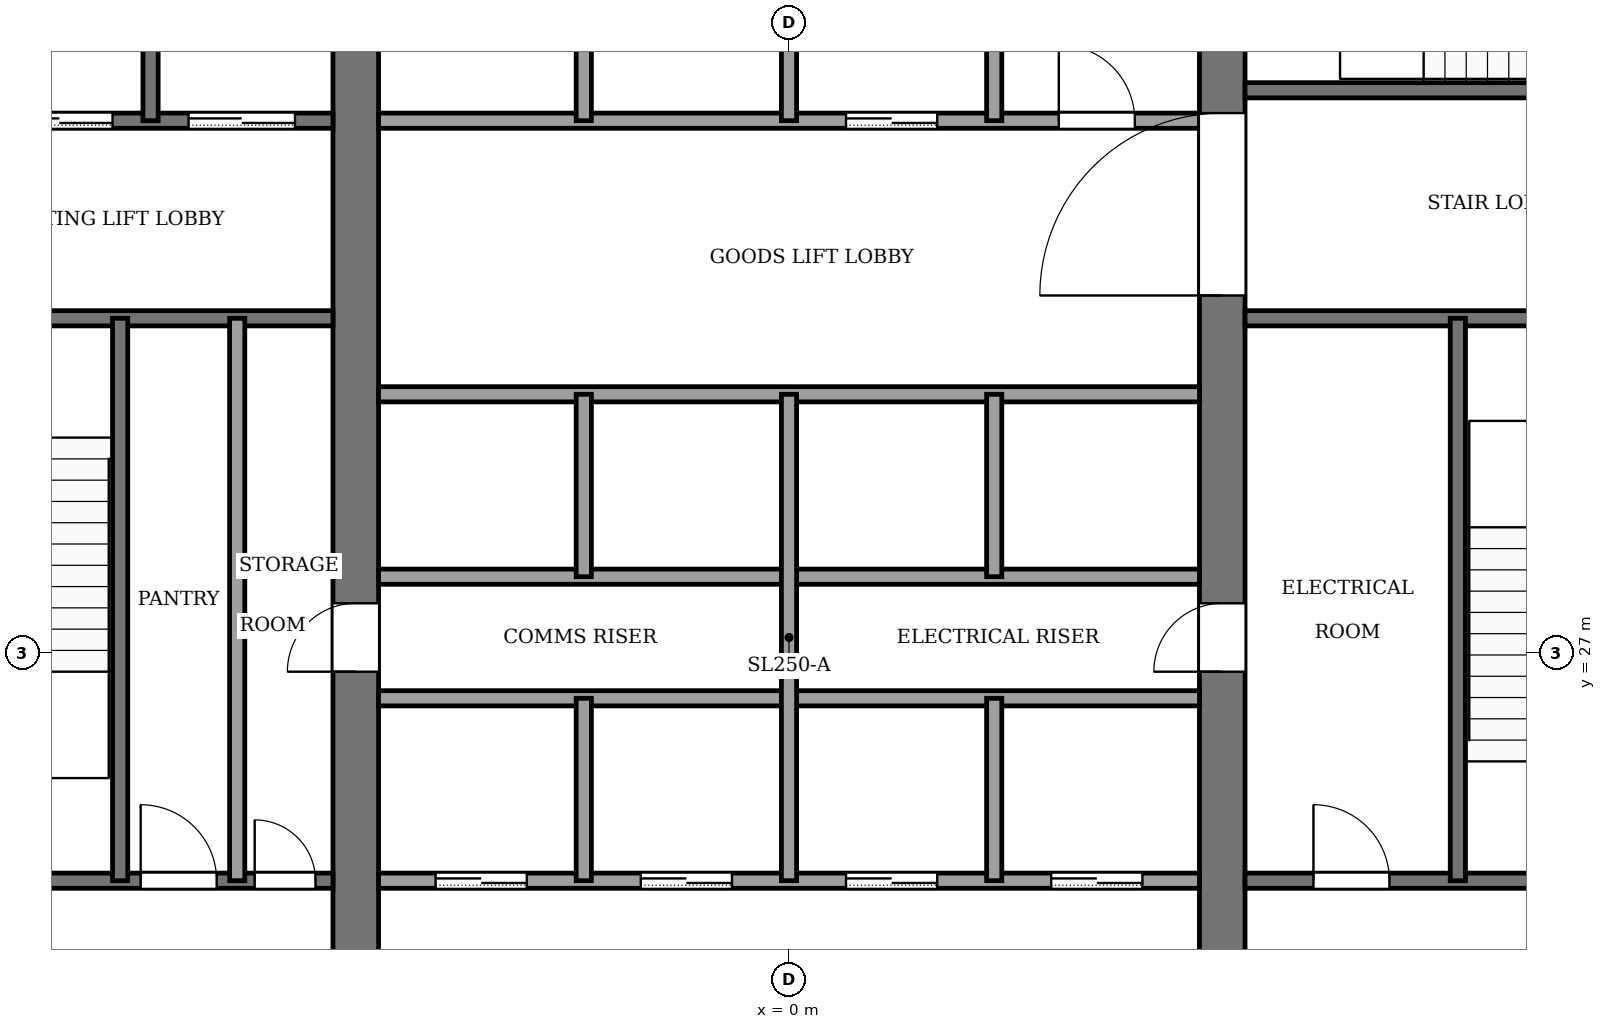
"""IFC4 building model, lengths in metres.
Left out: names, types, materials, properties, quantities, classifications, styles, units other than length and angle.
Written with IfcOpenShell. Run it as: python <this file> out.ifc"""

import sys

from ifc_helpers import new_model, si_unit, direction, frame, frame_2d, origin, place, context, subcontext, project, spatial, rectangle, extrude, element, fill, save


model = new_model("IFC4")
c1 = context("Model", 3, precision=1e-05, world=origin(), true_north=direction((0.0, 1.0)))
c2 = subcontext(c1, "Body", "Model", "MODEL_VIEW")
j1 = project(units=[si_unit("LENGTHUNIT", "METRE"), si_unit("PLANEANGLEUNIT", "RADIAN")], contexts=[c1])
p1 = place(None, origin())
s1 = spatial("IfcSite", under=j1, at=p1, CompositionType="ELEMENT")
p2 = place(p1, origin())
s2 = spatial("IfcBuilding", under=s1, at=p2, CompositionType="ELEMENT")
p3 = place(p2, frame((0.0, 0.0, 38.0)))
s3 = spatial("IfcBuildingStorey", under=s2, at=p3, CompositionType="ELEMENT", Elevation=38.0)
p4 = place(p3, frame((-5.7, 18.4, -0.13), z_axis=(0.0, 0.0, 1.0), x_axis=(0.0, 1.0, 0.0)))
e1 = element("IfcWall", 1, at=p4, inside=s3, PredefinedType="SHEAR", context=c2, shape_type="SweptSolid", body=[
    extrude(rectangle(XDim=19.2, YDim=0.6, at=frame_2d((9.6, 0.0))), origin(), (0.0, 0.0, 1.0), 4.0),
])
p5 = place(p4, frame((8.35, 0.0, 0.13)))
e2 = element("IfcOpeningElement", 2, at=p5, cuts=e1, PredefinedType="OPENING", context=c2, shape_type="SweptSolid", body=[
    extrude(rectangle(XDim=0.9, YDim=2.1, at=frame_2d((0.45, 1.05))), frame((0.0, 0.31, 0.0), z_axis=(0.0, -1.0, 0.0), x_axis=(1.0, 0.0, 0.0)), (0.0, 0.0, 1.0), 0.62),
])
p6 = place(p3, frame((5.7, 18.4, -0.13), z_axis=(0.0, 0.0, 1.0), x_axis=(0.0, 1.0, 0.0)))
e3 = element("IfcWall", 3, at=p6, inside=s3, PredefinedType="SHEAR", context=c2, shape_type="SweptSolid", body=[
    extrude(rectangle(XDim=19.2, YDim=0.6, at=frame_2d((9.6, 0.0))), origin(), (0.0, 0.0, 1.0), 4.0),
])
p7 = place(p6, frame((8.35, 0.0, 0.13)))
e4 = element("IfcOpeningElement", 4, at=p7, cuts=e3, PredefinedType="OPENING", context=c2, shape_type="SweptSolid", body=[
    extrude(rectangle(XDim=0.9, YDim=2.1, at=frame_2d((0.45, 1.05))), frame((0.0, 0.31, 0.0), z_axis=(0.0, -1.0, 0.0), x_axis=(1.0, 0.0, 0.0)), (0.0, 0.0, 1.0), 0.62),
])
p8 = place(p6, frame((13.3, 0.0, 0.13)))
e5 = element("IfcOpeningElement", 5, at=p8, cuts=e3, PredefinedType="OPENING", context=c2, shape_type="SweptSolid", body=[
    extrude(rectangle(XDim=2.4, YDim=2.4, at=frame_2d((1.2, 1.2))), frame((0.0, 0.31, 0.0), z_axis=(0.0, -1.0, 0.0), x_axis=(1.0, 0.0, 0.0)), (0.0, 0.0, 1.0), 0.62),
])
p9 = place(p3, frame((-12.6, 24.0, 0.0), z_axis=(0.0, 0.0, 1.0), x_axis=(1.0, 0.0, 0.0)))
e6 = element("IfcWall", 6, at=p9, inside=s3, PredefinedType="PARTITIONING", context=c2, shape_type="SweptSolid", body=[
    extrude(rectangle(XDim=6.6, YDim=0.2, at=frame_2d((3.3, 0.0))), origin(), (0.0, 0.0, 1.0), 3.87),
])
p10 = place(p9, frame((4.07, 0.0, 0.0)))
e7 = element("IfcOpeningElement", 7, at=p10, cuts=e6, PredefinedType="OPENING", context=c2, shape_type="SweptSolid", body=[
    extrude(rectangle(XDim=1.0, YDim=2.1, at=frame_2d((0.5, 1.05))), frame((0.0, 0.11, 0.0), z_axis=(0.0, -1.0, 0.0), x_axis=(1.0, 0.0, 0.0)), (0.0, 0.0, 1.0), 0.22),
])
p11 = place(p9, frame((5.57, 0.0, 0.0)))
e8 = element("IfcOpeningElement", 8, at=p11, cuts=e6, PredefinedType="OPENING", context=c2, shape_type="SweptSolid", body=[
    extrude(rectangle(XDim=0.8, YDim=2.1, at=frame_2d((0.4, 1.05))), frame((0.0, 0.11, 0.0), z_axis=(0.0, -1.0, 0.0), x_axis=(1.0, 0.0, 0.0)), (0.0, 0.0, 1.0), 0.22),
])
p12 = place(p3, frame((-5.4, 24.0, 0.0), z_axis=(0.0, 0.0, 1.0), x_axis=(1.0, 0.0, 0.0)))
e9 = element("IfcWall", 9, at=p12, inside=s3, PredefinedType="PARTITIONING", context=c2, shape_type="SweptSolid", body=[
    extrude(rectangle(XDim=10.8, YDim=0.2, at=frame_2d((5.4, 0.0))), origin(), (0.0, 0.0, 1.0), 3.87),
])
p13 = place(p12, frame((0.75, 0.0, 0.0)))
e10 = element("IfcOpeningElement", 10, at=p13, cuts=e9, PredefinedType="OPENING", context=c2, shape_type="SweptSolid", body=[
    extrude(rectangle(XDim=1.2, YDim=2.2, at=frame_2d((0.6, 1.1))), frame((0.0, 0.11, 0.0), z_axis=(0.0, -1.0, 0.0), x_axis=(1.0, 0.0, 0.0)), (0.0, 0.0, 1.0), 0.22),
])
p14 = place(p12, frame((3.45, 0.0, 0.0)))
e11 = element("IfcOpeningElement", 11, at=p14, cuts=e9, PredefinedType="OPENING", context=c2, shape_type="SweptSolid", body=[
    extrude(rectangle(XDim=1.2, YDim=2.2, at=frame_2d((0.6, 1.1))), frame((0.0, 0.11, 0.0), z_axis=(0.0, -1.0, 0.0), x_axis=(1.0, 0.0, 0.0)), (0.0, 0.0, 1.0), 0.22),
])
p15 = place(p12, frame((6.15, 0.0, 0.0)))
e12 = element("IfcOpeningElement", 12, at=p15, cuts=e9, PredefinedType="OPENING", context=c2, shape_type="SweptSolid", body=[
    extrude(rectangle(XDim=1.2, YDim=2.2, at=frame_2d((0.6, 1.1))), frame((0.0, 0.11, 0.0), z_axis=(0.0, -1.0, 0.0), x_axis=(1.0, 0.0, 0.0)), (0.0, 0.0, 1.0), 0.22),
])
p16 = place(p12, frame((8.85, 0.0, 0.0)))
e13 = element("IfcOpeningElement", 13, at=p16, cuts=e9, PredefinedType="OPENING", context=c2, shape_type="SweptSolid", body=[
    extrude(rectangle(XDim=1.2, YDim=2.2, at=frame_2d((0.6, 1.1))), frame((0.0, 0.11, 0.0), z_axis=(0.0, -1.0, 0.0), x_axis=(1.0, 0.0, 0.0)), (0.0, 0.0, 1.0), 0.22),
])
p17 = place(p3, frame((6.0, 24.0, 0.0), z_axis=(0.0, 0.0, 1.0), x_axis=(1.0, 0.0, 0.0)))
e14 = element("IfcWall", 14, at=p17, inside=s3, PredefinedType="PARTITIONING", context=c2, shape_type="SweptSolid", body=[
    extrude(rectangle(XDim=6.6, YDim=0.2, at=frame_2d((3.3, 0.0))), origin(), (0.0, 0.0, 1.0), 3.87),
])
p18 = place(p17, frame((0.9, 0.0, 0.0)))
e15 = element("IfcOpeningElement", 15, at=p18, cuts=e14, PredefinedType="OPENING", context=c2, shape_type="SweptSolid", body=[
    extrude(rectangle(XDim=1.0, YDim=2.1, at=frame_2d((0.5, 1.05))), frame((0.0, 0.11, 0.0), z_axis=(0.0, -1.0, 0.0), x_axis=(1.0, 0.0, 0.0)), (0.0, 0.0, 1.0), 0.22),
])
p19 = place(p17, frame((4.4, 0.0, 0.0)))
e16 = element("IfcOpeningElement", 16, at=p19, cuts=e14, PredefinedType="OPENING", context=c2, shape_type="SweptSolid", body=[
    extrude(rectangle(XDim=1.2, YDim=2.2, at=frame_2d((0.6, 1.1))), frame((0.0, 0.11, 0.0), z_axis=(0.0, -1.0, 0.0), x_axis=(1.0, 0.0, 0.0)), (0.0, 0.0, 1.0), 0.22),
])
for number, where, z_axis, x_axis in (
    (17, (-5.4, 26.4, 0.0), (0.0, 0.0, 1.0), (1.0, 0.0, 0.0)),
    (18, (-5.4, 28.0, 0.0), (0.0, 0.0, 1.0), (1.0, 0.0, 0.0)),
    (19, (-5.4, 30.4, 0.0), (0.0, 0.0, 1.0), (1.0, 0.0, 0.0)),
):
    element("IfcWall", number, at=place(p3, frame(where, z_axis=z_axis, x_axis=x_axis)), inside=s3, PredefinedType="PARTITIONING", context=c2, shape_type="SweptSolid", body=[
        extrude(rectangle(XDim=10.8, YDim=0.2, at=frame_2d((5.4, 0.0))), origin(), (0.0, 0.0, 1.0), 3.87),
    ])
p20 = place(p3, frame((-12.6, 31.4, 0.0), z_axis=(0.0, 0.0, 1.0), x_axis=(1.0, 0.0, 0.0)))
e20 = element("IfcWall", 20, at=p20, inside=s3, PredefinedType="PARTITIONING", context=c2, shape_type="SweptSolid", body=[
    extrude(rectangle(XDim=6.6, YDim=0.2, at=frame_2d((3.3, 0.0))), origin(), (0.0, 0.0, 1.0), 3.87),
])
p21 = place(p20, frame((1.0, 0.0, 0.0)))
e21 = element("IfcOpeningElement", 21, at=p21, cuts=e20, PredefinedType="OPENING", context=c2, shape_type="SweptSolid", body=[
    extrude(rectangle(XDim=1.2, YDim=2.2, at=frame_2d((0.6, 1.1))), frame((0.0, 0.11, 0.0), z_axis=(0.0, -1.0, 0.0), x_axis=(1.0, 0.0, 0.0)), (0.0, 0.0, 1.0), 0.22),
])
p22 = place(p3, frame((6.0, 31.4, 0.0), z_axis=(0.0, 0.0, 1.0), x_axis=(1.0, 0.0, 0.0)))
e22 = element("IfcWall", 22, at=p22, inside=s3, PredefinedType="PARTITIONING", context=c2, shape_type="SweptSolid", body=[
    extrude(rectangle(XDim=6.6, YDim=0.2, at=frame_2d((3.3, 0.0))), origin(), (0.0, 0.0, 1.0), 3.87),
])
p23 = place(p3, frame((-12.6, 34.0, 0.0), z_axis=(0.0, 0.0, 1.0), x_axis=(1.0, 0.0, 0.0)))
e23 = element("IfcWall", 23, at=p23, inside=s3, PredefinedType="PARTITIONING", context=c2, shape_type="SweptSolid", body=[
    extrude(rectangle(XDim=6.6, YDim=0.2, at=frame_2d((3.3, 0.0))), origin(), (0.0, 0.0, 1.0), 3.87),
])
p24 = place(p23, frame((4.7, 0.0, 0.0)))
e24 = element("IfcOpeningElement", 24, at=p24, cuts=e23, PredefinedType="OPENING", context=c2, shape_type="SweptSolid", body=[
    extrude(rectangle(XDim=1.4, YDim=2.2, at=frame_2d((0.7, 1.1))), frame((0.0, 0.11, 0.0), z_axis=(0.0, -1.0, 0.0), x_axis=(1.0, 0.0, 0.0)), (0.0, 0.0, 1.0), 0.22),
])
p25 = place(p23, frame((2.3, 0.0, 0.0)))
e25 = element("IfcOpeningElement", 25, at=p25, cuts=e23, PredefinedType="OPENING", context=c2, shape_type="SweptSolid", body=[
    extrude(rectangle(XDim=1.4, YDim=2.2, at=frame_2d((0.7, 1.1))), frame((0.0, 0.11, 0.0), z_axis=(0.0, -1.0, 0.0), x_axis=(1.0, 0.0, 0.0)), (0.0, 0.0, 1.0), 0.22),
])
p26 = place(p23, frame((0.45, 0.0, 0.0)))
e26 = element("IfcOpeningElement", 26, at=p26, cuts=e23, PredefinedType="OPENING", context=c2, shape_type="SweptSolid", body=[
    extrude(rectangle(XDim=0.9, YDim=2.1, at=frame_2d((0.45, 1.05))), frame((0.0, 0.11, 0.0), z_axis=(0.0, -1.0, 0.0), x_axis=(1.0, 0.0, 0.0)), (0.0, 0.0, 1.0), 0.22),
])
p27 = place(p3, frame((-5.4, 34.0, 0.0), z_axis=(0.0, 0.0, 1.0), x_axis=(1.0, 0.0, 0.0)))
e27 = element("IfcWall", 27, at=p27, inside=s3, PredefinedType="PARTITIONING", context=c2, shape_type="SweptSolid", body=[
    extrude(rectangle(XDim=10.8, YDim=0.2, at=frame_2d((5.4, 0.0))), origin(), (0.0, 0.0, 1.0), 3.87),
])
p28 = place(p27, frame((6.15, 0.0, 0.0)))
e28 = element("IfcOpeningElement", 28, at=p28, cuts=e27, PredefinedType="OPENING", context=c2, shape_type="SweptSolid", body=[
    extrude(rectangle(XDim=1.2, YDim=2.2, at=frame_2d((0.6, 1.1))), frame((0.0, 0.11, 0.0), z_axis=(0.0, -1.0, 0.0), x_axis=(1.0, 0.0, 0.0)), (0.0, 0.0, 1.0), 0.22),
])
p29 = place(p27, frame((8.95, 0.0, 0.0)))
e29 = element("IfcOpeningElement", 29, at=p29, cuts=e27, PredefinedType="OPENING", context=c2, shape_type="SweptSolid", body=[
    extrude(rectangle(XDim=1.0, YDim=2.1, at=frame_2d((0.5, 1.05))), frame((0.0, 0.11, 0.0), z_axis=(0.0, -1.0, 0.0), x_axis=(1.0, 0.0, 0.0)), (0.0, 0.0, 1.0), 0.22),
])
p30 = place(p3, frame((6.0, 34.4, 0.0), z_axis=(0.0, 0.0, 1.0), x_axis=(1.0, 0.0, 0.0)))
e30 = element("IfcWall", 30, at=p30, inside=s3, PredefinedType="PARTITIONING", context=c2, shape_type="SweptSolid", body=[
    extrude(rectangle(XDim=6.6, YDim=0.2, at=frame_2d((3.3, 0.0))), origin(), (0.0, 0.0, 1.0), 3.87),
])
p31 = place(p30, frame((4.8, 0.0, 0.0)))
e31 = element("IfcOpeningElement", 31, at=p31, cuts=e30, PredefinedType="OPENING", context=c2, shape_type="SweptSolid", body=[
    extrude(rectangle(XDim=1.2, YDim=2.2, at=frame_2d((0.6, 1.1))), frame((0.0, 0.11, 0.0), z_axis=(0.0, -1.0, 0.0), x_axis=(1.0, 0.0, 0.0)), (0.0, 0.0, 1.0), 0.22),
])
p32 = place(p3, frame((-8.8, 24.0, 0.0), z_axis=(0.0, 0.0, 1.0), x_axis=(0.0, 1.0, 0.0)))
e32 = element("IfcWall", 32, at=p32, inside=s3, PredefinedType="PARTITIONING", context=c2, shape_type="SweptSolid", body=[
    extrude(rectangle(XDim=7.4, YDim=0.2, at=frame_2d((3.7, 0.0))), origin(), (0.0, 0.0, 1.0), 3.87),
])
p33 = place(p3, frame((-8.4, 34.0, 0.0), z_axis=(0.0, 0.0, 1.0), x_axis=(0.0, 1.0, 0.0)))
e33 = element("IfcWall", 33, at=p33, inside=s3, PredefinedType="PARTITIONING", context=c2, shape_type="SweptSolid", body=[
    extrude(rectangle(XDim=3.6, YDim=0.2, at=frame_2d((1.8, 0.0))), origin(), (0.0, 0.0, 1.0), 3.87),
])
p34 = place(p3, frame((-7.26, 24.0, 0.0), z_axis=(0.0, 0.0, 1.0), x_axis=(0.0, 1.0, 0.0)))
e34 = element("IfcWall", 34, at=p34, inside=s3, PredefinedType="PARTITIONING", context=c2, shape_type="SweptSolid", body=[
    extrude(rectangle(XDim=7.4, YDim=0.2, at=frame_2d((3.7, 0.0))), origin(), (0.0, 0.0, 1.0), 3.87),
])
for number, where, z_axis, x_axis in (
    (35, (-2.7, 24.0, 0.0), (0.0, 0.0, 1.0), (0.0, 1.0, 0.0)),
    (36, (-2.7, 28.0, 0.0), (0.0, 0.0, 1.0), (0.0, 1.0, 0.0)),
):
    element("IfcWall", number, at=place(p3, frame(where, z_axis=z_axis, x_axis=x_axis)), inside=s3, PredefinedType="PARTITIONING", context=c2, shape_type="SweptSolid", body=[
        extrude(rectangle(XDim=2.4, YDim=0.2, at=frame_2d((1.2, 0.0))), origin(), (0.0, 0.0, 1.0), 3.87),
    ])
p35 = place(p3, frame((-2.7, 34.0, 0.0), z_axis=(0.0, 0.0, 1.0), x_axis=(0.0, 1.0, 0.0)))
e37 = element("IfcWall", 37, at=p35, inside=s3, PredefinedType="PARTITIONING", context=c2, shape_type="SweptSolid", body=[
    extrude(rectangle(XDim=3.6, YDim=0.2, at=frame_2d((1.8, 0.0))), origin(), (0.0, 0.0, 1.0), 3.87),
])
p36 = place(p3, frame((0.0, 24.0, 0.0), z_axis=(0.0, 0.0, 1.0), x_axis=(0.0, 1.0, 0.0)))
e38 = element("IfcWall", 38, at=p36, inside=s3, PredefinedType="PARTITIONING", context=c2, shape_type="SweptSolid", body=[
    extrude(rectangle(XDim=6.4, YDim=0.2, at=frame_2d((3.2, 0.0))), origin(), (0.0, 0.0, 1.0), 3.87),
])
p37 = place(p3, frame((0.0, 34.0, 0.0), z_axis=(0.0, 0.0, 1.0), x_axis=(0.0, 1.0, 0.0)))
e39 = element("IfcWall", 39, at=p37, inside=s3, PredefinedType="PARTITIONING", context=c2, shape_type="SweptSolid", body=[
    extrude(rectangle(XDim=3.6, YDim=0.2, at=frame_2d((1.8, 0.0))), origin(), (0.0, 0.0, 1.0), 3.87),
])
for number, where, z_axis, x_axis in (
    (40, (2.7, 24.0, 0.0), (0.0, 0.0, 1.0), (0.0, 1.0, 0.0)),
    (41, (2.7, 28.0, 0.0), (0.0, 0.0, 1.0), (0.0, 1.0, 0.0)),
):
    element("IfcWall", number, at=place(p3, frame(where, z_axis=z_axis, x_axis=x_axis)), inside=s3, PredefinedType="PARTITIONING", context=c2, shape_type="SweptSolid", body=[
        extrude(rectangle(XDim=2.4, YDim=0.2, at=frame_2d((1.2, 0.0))), origin(), (0.0, 0.0, 1.0), 3.87),
    ])
p38 = place(p3, frame((2.7, 34.0, 0.0), z_axis=(0.0, 0.0, 1.0), x_axis=(0.0, 1.0, 0.0)))
e42 = element("IfcWall", 42, at=p38, inside=s3, PredefinedType="PARTITIONING", context=c2, shape_type="SweptSolid", body=[
    extrude(rectangle(XDim=3.6, YDim=0.2, at=frame_2d((1.8, 0.0))), origin(), (0.0, 0.0, 1.0), 3.87),
])
p39 = place(p3, frame((8.8, 24.0, 0.0), z_axis=(0.0, 0.0, 1.0), x_axis=(0.0, 1.0, 0.0)))
e43 = element("IfcWall", 43, at=p39, inside=s3, PredefinedType="PARTITIONING", context=c2, shape_type="SweptSolid", body=[
    extrude(rectangle(XDim=7.4, YDim=0.2, at=frame_2d((3.7, 0.0))), origin(), (0.0, 0.0, 1.0), 3.87),
])
p40 = place(p13, origin())
e44 = element("IfcDoor", 44, at=p40, inside=s3, OperationType="SLIDING_TO_LEFT", PredefinedType="DOOR", context=c2, shape_type="SweptSolid", body=[
    extrude(rectangle(XDim=1.2, YDim=2.2, at=frame_2d((0.6, 1.1))), frame((0.0, 0.025, 0.0), z_axis=(0.0, -1.0, 0.0), x_axis=(1.0, 0.0, 0.0)), (0.0, 0.0, 1.0), 0.05),
])
fill(e10, e44)
p41 = place(p14, origin())
e45 = element("IfcDoor", 45, at=p41, inside=s3, OperationType="SLIDING_TO_LEFT", PredefinedType="DOOR", context=c2, shape_type="SweptSolid", body=[
    extrude(rectangle(XDim=1.2, YDim=2.2, at=frame_2d((0.6, 1.1))), frame((0.0, 0.025, 0.0), z_axis=(0.0, -1.0, 0.0), x_axis=(1.0, 0.0, 0.0)), (0.0, 0.0, 1.0), 0.05),
])
fill(e11, e45)
p42 = place(p15, origin())
e46 = element("IfcDoor", 46, at=p42, inside=s3, OperationType="SLIDING_TO_LEFT", PredefinedType="DOOR", context=c2, shape_type="SweptSolid", body=[
    extrude(rectangle(XDim=1.2, YDim=2.2, at=frame_2d((0.6, 1.1))), frame((0.0, 0.025, 0.0), z_axis=(0.0, -1.0, 0.0), x_axis=(1.0, 0.0, 0.0)), (0.0, 0.0, 1.0), 0.05),
])
fill(e12, e46)
p43 = place(p16, origin())
e47 = element("IfcDoor", 47, at=p43, inside=s3, OperationType="SLIDING_TO_LEFT", PredefinedType="DOOR", context=c2, shape_type="SweptSolid", body=[
    extrude(rectangle(XDim=1.2, YDim=2.2, at=frame_2d((0.6, 1.1))), frame((0.0, 0.025, 0.0), z_axis=(0.0, -1.0, 0.0), x_axis=(1.0, 0.0, 0.0)), (0.0, 0.0, 1.0), 0.05),
])
fill(e13, e47)
p44 = place(p28, origin())
e48 = element("IfcDoor", 48, at=p44, inside=s3, OperationType="SLIDING_TO_LEFT", PredefinedType="DOOR", context=c2, shape_type="SweptSolid", body=[
    extrude(rectangle(XDim=1.2, YDim=2.2, at=frame_2d((0.6, 1.1))), frame((0.0, 0.025, 0.0), z_axis=(0.0, -1.0, 0.0), x_axis=(1.0, 0.0, 0.0)), (0.0, 0.0, 1.0), 0.05),
])
fill(e28, e48)
p45 = place(p24, origin())
e49 = element("IfcDoor", 49, at=p45, inside=s3, OperationType="SLIDING_TO_LEFT", PredefinedType="DOOR", context=c2, shape_type="SweptSolid", body=[
    extrude(rectangle(XDim=1.4, YDim=2.2, at=frame_2d((0.7, 1.1))), frame((0.0, 0.025, 0.0), z_axis=(0.0, -1.0, 0.0), x_axis=(1.0, 0.0, 0.0)), (0.0, 0.0, 1.0), 0.05),
])
fill(e24, e49)
p46 = place(p25, origin())
e50 = element("IfcDoor", 50, at=p46, inside=s3, OperationType="SLIDING_TO_LEFT", PredefinedType="DOOR", context=c2, shape_type="SweptSolid", body=[
    extrude(rectangle(XDim=1.4, YDim=2.2, at=frame_2d((0.7, 1.1))), frame((0.0, 0.025, 0.0), z_axis=(0.0, -1.0, 0.0), x_axis=(1.0, 0.0, 0.0)), (0.0, 0.0, 1.0), 0.05),
])
fill(e25, e50)
p47 = place(p10, origin())
e51 = element("IfcDoor", 51, at=p47, inside=s3, OperationType="SINGLE_SWING_RIGHT", PredefinedType="DOOR", context=c2, shape_type="SweptSolid", body=[
    extrude(rectangle(XDim=1.0, YDim=2.1, at=frame_2d((0.5, 1.05))), frame((0.0, 0.025, 0.0), z_axis=(0.0, -1.0, 0.0), x_axis=(1.0, 0.0, 0.0)), (0.0, 0.0, 1.0), 0.05),
])
fill(e7, e51)
p48 = place(p11, origin())
e52 = element("IfcDoor", 52, at=p48, inside=s3, OperationType="SINGLE_SWING_LEFT", PredefinedType="DOOR", context=c2, shape_type="SweptSolid", body=[
    extrude(rectangle(XDim=0.8, YDim=2.1, at=frame_2d((0.4, 1.05))), frame((0.0, 0.025, 0.0), z_axis=(0.0, -1.0, 0.0), x_axis=(1.0, 0.0, 0.0)), (0.0, 0.0, 1.0), 0.05),
])
fill(e8, e52)
p49 = place(p18, origin())
e53 = element("IfcDoor", 53, at=p49, inside=s3, OperationType="SINGLE_SWING_RIGHT", PredefinedType="DOOR", context=c2, shape_type="SweptSolid", body=[
    extrude(rectangle(XDim=1.0, YDim=2.1, at=frame_2d((0.5, 1.05))), frame((0.0, 0.025, 0.0), z_axis=(0.0, -1.0, 0.0), x_axis=(1.0, 0.0, 0.0)), (0.0, 0.0, 1.0), 0.05),
])
fill(e15, e53)
p50 = place(p29, origin())
e54 = element("IfcDoor", 54, at=p50, inside=s3, OperationType="SINGLE_SWING_LEFT", PredefinedType="DOOR", context=c2, shape_type="SweptSolid", body=[
    extrude(rectangle(XDim=1.0, YDim=2.1, at=frame_2d((0.5, 1.05))), frame((0.0, 0.025, 0.0), z_axis=(0.0, -1.0, 0.0), x_axis=(1.0, 0.0, 0.0)), (0.0, 0.0, 1.0), 0.05),
])
fill(e29, e54)
p51 = place(p5, origin())
e55 = element("IfcDoor", 55, at=p51, inside=s3, OperationType="SINGLE_SWING_LEFT", PredefinedType="DOOR", context=c2, shape_type="SweptSolid", body=[
    extrude(rectangle(XDim=0.9, YDim=2.1, at=frame_2d((0.45, 1.05))), frame((0.0, 0.025, 0.0), z_axis=(0.0, -1.0, 0.0), x_axis=(1.0, 0.0, 0.0)), (0.0, 0.0, 1.0), 0.05),
])
fill(e2, e55)
p52 = place(p7, origin())
e56 = element("IfcDoor", 56, at=p52, inside=s3, OperationType="SINGLE_SWING_RIGHT", PredefinedType="DOOR", context=c2, shape_type="SweptSolid", body=[
    extrude(rectangle(XDim=0.9, YDim=2.1, at=frame_2d((0.45, 1.05))), frame((0.0, 0.025, 0.0), z_axis=(0.0, -1.0, 0.0), x_axis=(1.0, 0.0, 0.0)), (0.0, 0.0, 1.0), 0.05),
])
fill(e4, e56)
p53 = place(p8, origin())
e57 = element("IfcDoor", 57, at=p53, inside=s3, OperationType="DOUBLE_DOOR_SINGLE_SWING", PredefinedType="DOOR", context=c2, shape_type="SweptSolid", body=[
    extrude(rectangle(XDim=2.4, YDim=2.4, at=frame_2d((1.2, 1.2))), frame((0.0, 0.025, 0.0), z_axis=(0.0, -1.0, 0.0), x_axis=(1.0, 0.0, 0.0)), (0.0, 0.0, 1.0), 0.05),
])
fill(e5, e57)
save(model, sys.argv[1])
